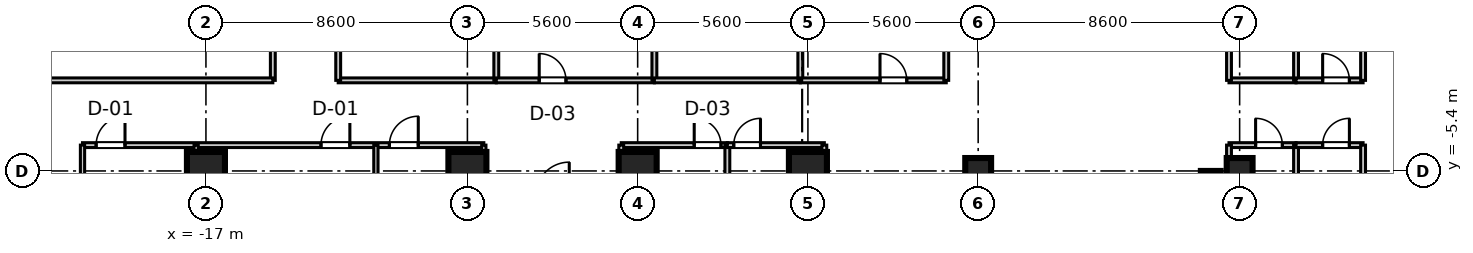
"""IFC4 building model, lengths in metres.
Left out: names, types, materials, properties, quantities, classifications, styles, units other than length and angle.
Written with IfcOpenShell. Run it as: python <this file> out.ifc"""

import sys

from ifc_helpers import new_model, si_unit, direction, frame, frame_2d, origin, origin_2d, place, context, subcontext, project, spatial, rectangle, extrude, source, transform, mapped, element, fill, save


model = new_model("IFC4")
c1 = context("Model", 3, precision=1e-05, world=origin(), true_north=direction((0.0, 1.0)))
c2 = subcontext(c1, "Body", "Model", "MODEL_VIEW")
j1 = project(units=[si_unit("LENGTHUNIT", "METRE"), si_unit("PLANEANGLEUNIT", "RADIAN")], contexts=[c1])
p1 = place(None, origin())
s1 = spatial("IfcSite", under=j1, at=p1, CompositionType="ELEMENT")
p2 = place(p1, origin())
s2 = spatial("IfcBuilding", under=s1, at=p2, CompositionType="ELEMENT")
p3 = place(p2, frame((0.0, 0.0, 132.1)))
s3 = spatial("IfcBuildingStorey", under=s2, at=p3, CompositionType="ELEMENT", Elevation=132.1)
m1 = source(origin(), c2, "Body", "SweptSolid", [
    extrude(rectangle(XDim=1.25, YDim=1.25, at=origin_2d()), origin(), (0.0, 0.0, 1.0), 3.605),
])
for number, where, z_axis, x_axis in (
    (1, (-17.0, -5.4, 0.0), (0.0, 0.0, 1.0), (1.0, 0.0, 0.0)),
    (2, (-8.4, -5.4, 0.0), (0.0, 0.0, 1.0), (1.0, 0.0, 0.0)),
    (3, (-2.8, -5.4, 0.0), (0.0, 0.0, 1.0), (1.0, 0.0, 0.0)),
    (4, (2.8, -5.4, 0.0), (0.0, 0.0, 1.0), (1.0, 0.0, 0.0)),
):
    element("IfcColumn", number, at=place(p3, frame(where, z_axis=z_axis, x_axis=x_axis)), inside=s3, PredefinedType="COLUMN", context=c2, shape_type="MappedRepresentation", body=[
        mapped(m1, transform((0.0, 0.0, 0.0), scale=1.0)),
    ])
m2 = source(origin(), c2, "Body", "SweptSolid", [
    extrude(rectangle(XDim=0.85, YDim=0.85, at=origin_2d()), origin(), (0.0, 0.0, 1.0), 3.605),
])
for number, where, z_axis, x_axis in (
    (5, (8.4, -5.4, 0.0), (0.0, 0.0, 1.0), (1.0, 0.0, 0.0)),
    (6, (17.0, -5.4, 0.0), (0.0, 0.0, 1.0), (1.0, 0.0, 0.0)),
):
    element("IfcColumn", number, at=place(p3, frame(where, z_axis=z_axis, x_axis=x_axis)), inside=s3, PredefinedType="PILASTER", context=c2, shape_type="MappedRepresentation", body=[
        mapped(m2, transform((0.0, 0.0, 0.0), scale=1.0)),
    ])
m3 = source(origin(), c2, "Body", "SweptSolid", [
    extrude(rectangle(XDim=11.6, YDim=0.65, at=frame_2d((5.8, 0.0))), origin(), (0.0, 0.0, 1.0), 3.38),
])
p4 = place(p3, frame((16.05, -17.0, 0.0), z_axis=(0.0, 0.0, 1.0), x_axis=(0.0, 1.0, 0.0)))
e7 = element("IfcWall", 7, at=p4, inside=s3, PredefinedType="SHEAR", context=c2, shape_type="MappedRepresentation", body=[
    mapped(m3, transform((0.0, 0.0, 0.0), scale=1.0)),
])
m4 = source(origin(), c2, "Body", "SweptSolid", [
    extrude(rectangle(XDim=2.205, YDim=0.16, at=frame_2d((1.103, 0.0))), origin(), (0.0, 0.0, 1.0), 2.72),
])
p5 = place(p3, frame((16.65, -4.55, 0.0), z_axis=(0.0, 0.0, 1.0), x_axis=(1.0, 0.0, 0.0)))
e8 = element("IfcWall", 8, at=p5, inside=s3, PredefinedType="PARTITIONING", context=c2, shape_type="MappedRepresentation", body=[
    mapped(m4, transform((0.0, 0.0, 0.0), scale=1.0)),
])
p6 = place(p5, frame((0.875, 0.0, 0.0)))
e9 = element("IfcOpeningElement", 9, at=p6, cuts=e8, PredefinedType="OPENING", context=c2, shape_type="SweptSolid", body=[
    extrude(rectangle(XDim=0.88, YDim=2.1, at=frame_2d((0.44, 1.05))), frame((0.0, 0.09, 0.0), z_axis=(0.0, -1.0, 0.0), x_axis=(1.0, 0.0, 0.0)), (0.0, 0.0, 1.0), 0.18),
])
m5 = source(origin(), c2, "Body", "SweptSolid", [
    extrude(rectangle(XDim=19.25, YDim=0.16, at=frame_2d((9.625, 0.0))), origin(), (0.0, 0.0, 1.0), 2.72),
])
for number, where, z_axis, x_axis in (
    (10, (16.65, -23.8, 0.0), (0.0, 0.0, 1.0), (0.0, 1.0, 0.0)),
    (11, (18.855, -23.8, 0.0), (0.0, 0.0, 1.0), (0.0, 1.0, 0.0)),
):
    element("IfcWall", number, at=place(p3, frame(where, z_axis=z_axis, x_axis=x_axis)), inside=s3, PredefinedType="PARTITIONING", context=c2, shape_type="MappedRepresentation", body=[
        mapped(m5, transform((0.0, 0.0, 0.0), scale=1.0)),
    ])
p7 = place(p3, frame((18.855, -4.55, 0.0), z_axis=(0.0, 0.0, 1.0), x_axis=(1.0, 0.0, 0.0)))
e12 = element("IfcWall", 12, at=p7, inside=s3, PredefinedType="PARTITIONING", context=c2, shape_type="MappedRepresentation", body=[
    mapped(m4, transform((0.0, 0.0, 0.0), scale=1.0)),
])
p8 = place(p7, frame((0.875, 0.0, 0.0)))
e13 = element("IfcOpeningElement", 13, at=p8, cuts=e12, PredefinedType="OPENING", context=c2, shape_type="SweptSolid", body=[
    extrude(rectangle(XDim=0.88, YDim=2.1, at=frame_2d((0.44, 1.05))), frame((0.0, 0.09, 0.0), z_axis=(0.0, -1.0, 0.0), x_axis=(1.0, 0.0, 0.0)), (0.0, 0.0, 1.0), 0.18),
])
m6 = source(origin(), c2, "Body", "SweptSolid", [
    extrude(rectangle(XDim=17.83, YDim=0.16, at=frame_2d((8.915, 0.0))), origin(), (0.0, 0.0, 1.0), 2.72),
])
p9 = place(p3, frame((21.06, -22.38, 0.0), z_axis=(0.0, 0.0, 1.0), x_axis=(0.0, 1.0, 0.0)))
e14 = element("IfcWall", 14, at=p9, inside=s3, PredefinedType="PARTITIONING", context=c2, shape_type="MappedRepresentation", body=[
    mapped(m6, transform((0.0, 0.0, 0.0), scale=1.0)),
])
m7 = source(origin(), c2, "Body", "SweptSolid", [
    extrude(rectangle(XDim=13.2, YDim=0.16, at=frame_2d((6.6, 0.0))), origin(), (0.0, 0.0, 1.0), 2.72),
])
p10 = place(p3, frame((-21.06, -4.55, 0.0), z_axis=(0.0, 0.0, 1.0), x_axis=(1.0, 0.0, 0.0)))
e15 = element("IfcWall", 15, at=p10, inside=s3, PredefinedType="PARTITIONING", context=c2, shape_type="MappedRepresentation", body=[
    mapped(m7, transform((0.0, 0.0, 0.0), scale=1.0)),
])
p11 = place(p10, frame((0.448, 0.0, 0.0)))
e16 = element("IfcOpeningElement", 16, at=p11, cuts=e15, PredefinedType="OPENING", context=c2, shape_type="SweptSolid", body=[
    extrude(rectangle(XDim=0.95, YDim=2.1, at=frame_2d((0.475, 1.05))), frame((0.0, 0.09, 0.0), z_axis=(0.0, -1.0, 0.0), x_axis=(1.0, 0.0, 0.0)), (0.0, 0.0, 1.0), 0.18),
])
p12 = place(p10, frame((7.844, 0.0, 0.0)))
e17 = element("IfcOpeningElement", 17, at=p12, cuts=e15, PredefinedType="OPENING", context=c2, shape_type="SweptSolid", body=[
    extrude(rectangle(XDim=0.95, YDim=2.1, at=frame_2d((0.475, 1.05))), frame((0.0, 0.09, 0.0), z_axis=(0.0, -1.0, 0.0), x_axis=(1.0, 0.0, 0.0)), (0.0, 0.0, 1.0), 0.18),
])
p13 = place(p10, frame((10.094, 0.0, 0.0)))
e18 = element("IfcOpeningElement", 18, at=p13, cuts=e15, PredefinedType="OPENING", context=c2, shape_type="SweptSolid", body=[
    extrude(rectangle(XDim=0.95, YDim=2.1, at=frame_2d((0.475, 1.05))), frame((0.0, 0.09, 0.0), z_axis=(0.0, -1.0, 0.0), x_axis=(1.0, 0.0, 0.0)), (0.0, 0.0, 1.0), 0.18),
])
m8 = source(origin(), c2, "Body", "SweptSolid", [
    extrude(rectangle(XDim=17.83, YDim=0.14, at=frame_2d((8.915, 0.0))), origin(), (0.0, 0.0, 1.0), 2.72),
])
p14 = place(p3, frame((-21.06, -22.38, 0.0), z_axis=(0.0, 0.0, 1.0), x_axis=(0.0, 1.0, 0.0)))
e19 = element("IfcWall", 19, at=p14, inside=s3, PredefinedType="PARTITIONING", context=c2, shape_type="MappedRepresentation", body=[
    mapped(m8, transform((0.0, 0.0, 0.0), scale=1.0)),
])
m9 = source(origin(), c2, "Body", "SweptSolid", [
    extrude(rectangle(XDim=19.25, YDim=0.14, at=frame_2d((9.625, 0.0))), origin(), (0.0, 0.0, 1.0), 2.72),
])
for number, where, z_axis, x_axis in (
    (20, (-7.86, -23.8, 0.0), (0.0, 0.0, 1.0), (0.0, 1.0, 0.0)),
    (21, (-17.322, -23.8, 0.0), (0.0, 0.0, 1.0), (0.0, 1.0, 0.0)),
    (22, (-11.41, -23.8, 0.0), (0.0, 0.0, 1.0), (0.0, 1.0, 0.0)),
):
    element("IfcWall", number, at=place(p3, frame(where, z_axis=z_axis, x_axis=x_axis)), inside=s3, PredefinedType="PARTITIONING", context=c2, shape_type="MappedRepresentation", body=[
        mapped(m9, transform((0.0, 0.0, 0.0), scale=1.0)),
    ])
m10 = source(origin(), c2, "Body", "SweptSolid", [
    extrude(rectangle(XDim=3.49, YDim=0.16, at=frame_2d((1.745, 0.0))), origin(), (0.0, 0.0, 1.0), 2.72),
])
p15 = place(p3, frame((-3.34, -4.55, 0.0), z_axis=(0.0, 0.0, 1.0), x_axis=(1.0, 0.0, 0.0)))
e23 = element("IfcWall", 23, at=p15, inside=s3, PredefinedType="PARTITIONING", context=c2, shape_type="MappedRepresentation", body=[
    mapped(m10, transform((0.0, 0.0, 0.0), scale=1.0)),
])
p16 = place(p15, frame((2.4, 0.0, 0.0)))
e24 = element("IfcOpeningElement", 24, at=p16, cuts=e23, PredefinedType="OPENING", context=c2, shape_type="SweptSolid", body=[
    extrude(rectangle(XDim=0.88, YDim=2.1, at=frame_2d((0.44, 1.05))), frame((0.0, 0.09, 0.0), z_axis=(0.0, -1.0, 0.0), x_axis=(1.0, 0.0, 0.0)), (0.0, 0.0, 1.0), 0.18),
])
for number, where, z_axis, x_axis in (
    (25, (-3.34, -23.8, 0.0), (0.0, 0.0, 1.0), (0.0, 1.0, 0.0)),
    (26, (0.15, -23.8, 0.0), (0.0, 0.0, 1.0), (0.0, 1.0, 0.0)),
):
    element("IfcWall", number, at=place(p3, frame(where, z_axis=z_axis, x_axis=x_axis)), inside=s3, PredefinedType="PARTITIONING", context=c2, shape_type="MappedRepresentation", body=[
        mapped(m5, transform((0.0, 0.0, 0.0), scale=1.0)),
    ])
m11 = source(origin(), c2, "Body", "SweptSolid", [
    extrude(rectangle(XDim=3.19, YDim=0.16, at=frame_2d((1.595, 0.0))), origin(), (0.0, 0.0, 1.0), 2.72),
])
p17 = place(p3, frame((0.15, -4.55, 0.0), z_axis=(0.0, 0.0, 1.0), x_axis=(1.0, 0.0, 0.0)))
e27 = element("IfcWall", 27, at=p17, inside=s3, PredefinedType="PARTITIONING", context=c2, shape_type="MappedRepresentation", body=[
    mapped(m11, transform((0.0, 0.0, 0.0), scale=1.0)),
])
p18 = place(p17, frame((0.21, 0.0, 0.0)))
e28 = element("IfcOpeningElement", 28, at=p18, cuts=e27, PredefinedType="OPENING", context=c2, shape_type="SweptSolid", body=[
    extrude(rectangle(XDim=0.88, YDim=2.1, at=frame_2d((0.44, 1.05))), frame((0.0, 0.09, 0.0), z_axis=(0.0, -1.0, 0.0), x_axis=(1.0, 0.0, 0.0)), (0.0, 0.0, 1.0), 0.18),
])
p19 = place(p3, frame((3.34, -23.8, 0.0), z_axis=(0.0, 0.0, 1.0), x_axis=(0.0, 1.0, 0.0)))
e29 = element("IfcWall", 29, at=p19, inside=s3, PredefinedType="PARTITIONING", context=c2, shape_type="MappedRepresentation", body=[
    mapped(m5, transform((0.0, 0.0, 0.0), scale=1.0)),
])
m12 = source(origin(), c2, "Body", "SweptSolid", [
    extrude(rectangle(XDim=4.84, YDim=0.16, at=frame_2d((2.42, 0.0))), origin(), (0.0, 0.0, 1.0), 2.72),
])
p20 = place(p3, frame((-14.8, -2.42, 0.0), z_axis=(0.0, 0.0, 1.0), x_axis=(0.0, 1.0, 0.0)))
e30 = element("IfcWall", 30, at=p20, inside=s3, PredefinedType="PARTITIONING", context=c2, shape_type="MappedRepresentation", body=[
    mapped(m12, transform((0.0, 0.0, 0.0), scale=1.0)),
])
m13 = source(origin(), c2, "Body", "SweptSolid", [
    extrude(rectangle(XDim=9.0, YDim=0.16, at=frame_2d((4.5, 0.0))), origin(), (0.0, 0.0, 1.0), 2.72),
])
p21 = place(p3, frame((-23.8, -2.42, 0.0), z_axis=(0.0, 0.0, 1.0), x_axis=(1.0, 0.0, 0.0)))
e31 = element("IfcWall", 31, at=p21, inside=s3, PredefinedType="PARTITIONING", context=c2, shape_type="MappedRepresentation", body=[
    mapped(m13, transform((0.0, 0.0, 0.0), scale=1.0)),
])
m14 = source(origin(), c2, "Body", "SweptSolid", [
    extrude(rectangle(XDim=5.2, YDim=0.16, at=frame_2d((2.6, 0.0))), origin(), (0.0, 0.0, 1.0), 2.72),
])
p22 = place(p3, frame((-12.65, -2.42, 0.0), z_axis=(0.0, 0.0, 1.0), x_axis=(1.0, 0.0, 0.0)))
e32 = element("IfcWall", 32, at=p22, inside=s3, PredefinedType="PARTITIONING", context=c2, shape_type="MappedRepresentation", body=[
    mapped(m14, transform((0.0, 0.0, 0.0), scale=1.0)),
])
for number, where, z_axis, x_axis in (
    (33, (-12.65, -2.42, 0.0), (0.0, 0.0, 1.0), (0.0, 1.0, 0.0)),
    (34, (-7.45, -2.42, 0.0), (0.0, 0.0, 1.0), (0.0, 1.0, 0.0)),
):
    element("IfcWall", number, at=place(p3, frame(where, z_axis=z_axis, x_axis=x_axis)), inside=s3, PredefinedType="PARTITIONING", context=c2, shape_type="MappedRepresentation", body=[
        mapped(m12, transform((0.0, 0.0, 0.0), scale=1.0)),
    ])
p23 = place(p3, frame((-7.45, -2.42, 0.0), z_axis=(0.0, 0.0, 1.0), x_axis=(1.0, 0.0, 0.0)))
e35 = element("IfcWall", 35, at=p23, inside=s3, PredefinedType="PARTITIONING", context=c2, shape_type="MappedRepresentation", body=[
    mapped(m14, transform((0.0, 0.0, 0.0), scale=1.0)),
])
p24 = place(p23, frame((1.412, 0.0, 0.0)))
e36 = element("IfcOpeningElement", 36, at=p24, cuts=e35, PredefinedType="OPENING", context=c2, shape_type="SweptSolid", body=[
    extrude(rectangle(XDim=0.88, YDim=2.1, at=frame_2d((0.44, 1.05))), frame((0.0, 0.09, 0.0), z_axis=(0.0, -1.0, 0.0), x_axis=(1.0, 0.0, 0.0)), (0.0, 0.0, 1.0), 0.18),
])
p25 = place(p3, frame((-2.25, -2.42, 0.0), z_axis=(0.0, 0.0, 1.0), x_axis=(0.0, 1.0, 0.0)))
e37 = element("IfcWall", 37, at=p25, inside=s3, PredefinedType="PARTITIONING", context=c2, shape_type="MappedRepresentation", body=[
    mapped(m12, transform((0.0, 0.0, 0.0), scale=1.0)),
])
m15 = source(origin(), c2, "Body", "SweptSolid", [
    extrude(rectangle(XDim=4.8, YDim=0.16, at=frame_2d((2.4, 0.0))), origin(), (0.0, 0.0, 1.0), 2.72),
])
p26 = place(p3, frame((-2.25, -2.42, 0.0), z_axis=(0.0, 0.0, 1.0), x_axis=(1.0, 0.0, 0.0)))
e38 = element("IfcWall", 38, at=p26, inside=s3, PredefinedType="PARTITIONING", context=c2, shape_type="MappedRepresentation", body=[
    mapped(m15, transform((0.0, 0.0, 0.0), scale=1.0)),
])
p27 = place(p3, frame((2.55, -2.42, 0.0), z_axis=(0.0, 0.0, 1.0), x_axis=(0.0, 1.0, 0.0)))
e39 = element("IfcWall", 39, at=p27, inside=s3, PredefinedType="PARTITIONING", context=c2, shape_type="MappedRepresentation", body=[
    mapped(m12, transform((0.0, 0.0, 0.0), scale=1.0)),
])
p28 = place(p3, frame((2.55, -2.42, 0.0), z_axis=(0.0, 0.0, 1.0), x_axis=(1.0, 0.0, 0.0)))
e40 = element("IfcWall", 40, at=p28, inside=s3, PredefinedType="PARTITIONING", context=c2, shape_type="MappedRepresentation", body=[
    mapped(m15, transform((0.0, 0.0, 0.0), scale=1.0)),
])
p29 = place(p28, frame((2.621, 0.0, 0.0)))
e41 = element("IfcOpeningElement", 41, at=p29, cuts=e40, PredefinedType="OPENING", context=c2, shape_type="SweptSolid", body=[
    extrude(rectangle(XDim=0.88, YDim=2.1, at=frame_2d((0.44, 1.05))), frame((0.0, 0.09, 0.0), z_axis=(0.0, -1.0, 0.0), x_axis=(1.0, 0.0, 0.0)), (0.0, 0.0, 1.0), 0.18),
])
p30 = place(p3, frame((7.35, -2.42, 0.0), z_axis=(0.0, 0.0, 1.0), x_axis=(0.0, 1.0, 0.0)))
e42 = element("IfcWall", 42, at=p30, inside=s3, PredefinedType="PARTITIONING", context=c2, shape_type="MappedRepresentation", body=[
    mapped(m12, transform((0.0, 0.0, 0.0), scale=1.0)),
])
p31 = place(p3, frame((16.65, -2.42, 0.0), z_axis=(0.0, 0.0, 1.0), x_axis=(1.0, 0.0, 0.0)))
e43 = element("IfcWall", 43, at=p31, inside=s3, PredefinedType="PARTITIONING", context=c2, shape_type="MappedRepresentation", body=[
    mapped(m4, transform((0.0, 0.0, 0.0), scale=1.0)),
])
for number, where, z_axis, x_axis in (
    (44, (16.65, -2.42, 0.0), (0.0, 0.0, 1.0), (0.0, 1.0, 0.0)),
    (45, (18.855, -2.42, 0.0), (0.0, 0.0, 1.0), (0.0, 1.0, 0.0)),
):
    element("IfcWall", number, at=place(p3, frame(where, z_axis=z_axis, x_axis=x_axis)), inside=s3, PredefinedType="PARTITIONING", context=c2, shape_type="MappedRepresentation", body=[
        mapped(m12, transform((0.0, 0.0, 0.0), scale=1.0)),
    ])
p32 = place(p3, frame((18.855, -2.42, 0.0), z_axis=(0.0, 0.0, 1.0), x_axis=(1.0, 0.0, 0.0)))
e46 = element("IfcWall", 46, at=p32, inside=s3, PredefinedType="PARTITIONING", context=c2, shape_type="MappedRepresentation", body=[
    mapped(m4, transform((0.0, 0.0, 0.0), scale=1.0)),
])
p33 = place(p32, frame((0.875, 0.0, 0.0)))
e47 = element("IfcOpeningElement", 47, at=p33, cuts=e46, PredefinedType="OPENING", context=c2, shape_type="SweptSolid", body=[
    extrude(rectangle(XDim=0.88, YDim=2.1, at=frame_2d((0.44, 1.05))), frame((0.0, 0.09, 0.0), z_axis=(0.0, -1.0, 0.0), x_axis=(1.0, 0.0, 0.0)), (0.0, 0.0, 1.0), 0.18),
])
p34 = place(p3, frame((21.06, -2.42, 0.0), z_axis=(0.0, 0.0, 1.0), x_axis=(0.0, 1.0, 0.0)))
e48 = element("IfcWall", 48, at=p34, inside=s3, PredefinedType="PARTITIONING", context=c2, shape_type="MappedRepresentation", body=[
    mapped(m12, transform((0.0, 0.0, 0.0), scale=1.0)),
])
m16 = source(origin(), c2, "Body", "SweptSolid", [
    extrude(rectangle(XDim=0.88, YDim=2.1, at=frame_2d((0.44, 1.05))), frame((0.0, 0.025, 0.0), z_axis=(0.0, -1.0, 0.0), x_axis=(1.0, 0.0, 0.0)), (0.0, 0.0, 1.0), 0.05),
])
p35 = place(p6, frame((0.88, 0.0, 0.0), z_axis=(0.0, 0.0, 1.0), x_axis=(-1.0, 0.0, 0.0)))
e49 = element("IfcDoor", 49, at=p35, inside=s3, OperationType="SINGLE_SWING_LEFT", PredefinedType="DOOR", context=c2, shape_type="MappedRepresentation", body=[
    mapped(m16, transform((0.0, 0.0, 0.0), scale=1.0)),
])
fill(e9, e49)
p36 = place(p8, frame((0.88, 0.0, 0.0), z_axis=(0.0, 0.0, 1.0), x_axis=(-1.0, 0.0, 0.0)))
e50 = element("IfcDoor", 50, at=p36, inside=s3, OperationType="SINGLE_SWING_RIGHT", PredefinedType="DOOR", context=c2, shape_type="MappedRepresentation", body=[
    mapped(m16, transform((0.0, 0.0, 0.0), scale=1.0)),
])
fill(e13, e50)
m17 = source(origin(), c2, "Body", "SweptSolid", [
    extrude(rectangle(XDim=0.95, YDim=2.1, at=frame_2d((0.475, 1.05))), frame((0.0, 0.025, 0.0), z_axis=(0.0, -1.0, 0.0), x_axis=(1.0, 0.0, 0.0)), (0.0, 0.0, 1.0), 0.05),
])
p37 = place(p11, frame((0.95, 0.0, 0.0), z_axis=(0.0, 0.0, 1.0), x_axis=(-1.0, 0.0, 0.0)))
e51 = element("IfcDoor", 51, at=p37, inside=s3, OperationType="SINGLE_SWING_RIGHT", PredefinedType="DOOR", context=c2, shape_type="MappedRepresentation", body=[
    mapped(m17, transform((0.0, 0.0, 0.0), scale=1.0)),
])
fill(e16, e51)
p38 = place(p12, frame((0.95, 0.0, 0.0), z_axis=(0.0, 0.0, 1.0), x_axis=(-1.0, 0.0, 0.0)))
e52 = element("IfcDoor", 52, at=p38, inside=s3, OperationType="SINGLE_SWING_RIGHT", PredefinedType="DOOR", context=c2, shape_type="MappedRepresentation", body=[
    mapped(m17, transform((0.0, 0.0, 0.0), scale=1.0)),
])
fill(e17, e52)
p39 = place(p13, frame((0.95, 0.0, 0.0), z_axis=(0.0, 0.0, 1.0), x_axis=(-1.0, 0.0, 0.0)))
e53 = element("IfcDoor", 53, at=p39, inside=s3, OperationType="SINGLE_SWING_RIGHT", PredefinedType="DOOR", context=c2, shape_type="MappedRepresentation", body=[
    mapped(m17, transform((0.0, 0.0, 0.0), scale=1.0)),
])
fill(e18, e53)
p40 = place(p16, frame((0.88, 0.0, 0.0), z_axis=(0.0, 0.0, 1.0), x_axis=(-1.0, 0.0, 0.0)))
e54 = element("IfcDoor", 54, at=p40, inside=s3, OperationType="SINGLE_SWING_LEFT", PredefinedType="DOOR", context=c2, shape_type="MappedRepresentation", body=[
    mapped(m16, transform((0.0, 0.0, 0.0), scale=1.0)),
])
fill(e24, e54)
p41 = place(p18, frame((0.88, 0.0, 0.0), z_axis=(0.0, 0.0, 1.0), x_axis=(-1.0, 0.0, 0.0)))
e55 = element("IfcDoor", 55, at=p41, inside=s3, OperationType="SINGLE_SWING_RIGHT", PredefinedType="DOOR", context=c2, shape_type="MappedRepresentation", body=[
    mapped(m16, transform((0.0, 0.0, 0.0), scale=1.0)),
])
fill(e28, e55)
p42 = place(p24, origin())
e56 = element("IfcDoor", 56, at=p42, inside=s3, OperationType="SINGLE_SWING_LEFT", PredefinedType="DOOR", context=c2, shape_type="MappedRepresentation", body=[
    mapped(m16, transform((0.0, 0.0, 0.0), scale=1.0)),
])
fill(e36, e56)
p43 = place(p29, origin())
e57 = element("IfcDoor", 57, at=p43, inside=s3, OperationType="SINGLE_SWING_LEFT", PredefinedType="DOOR", context=c2, shape_type="MappedRepresentation", body=[
    mapped(m16, transform((0.0, 0.0, 0.0), scale=1.0)),
])
fill(e41, e57)
p44 = place(p33, origin())
e58 = element("IfcDoor", 58, at=p44, inside=s3, OperationType="SINGLE_SWING_LEFT", PredefinedType="DOOR", context=c2, shape_type="MappedRepresentation", body=[
    mapped(m16, transform((0.0, 0.0, 0.0), scale=1.0)),
])
fill(e47, e58)
save(model, sys.argv[1])
